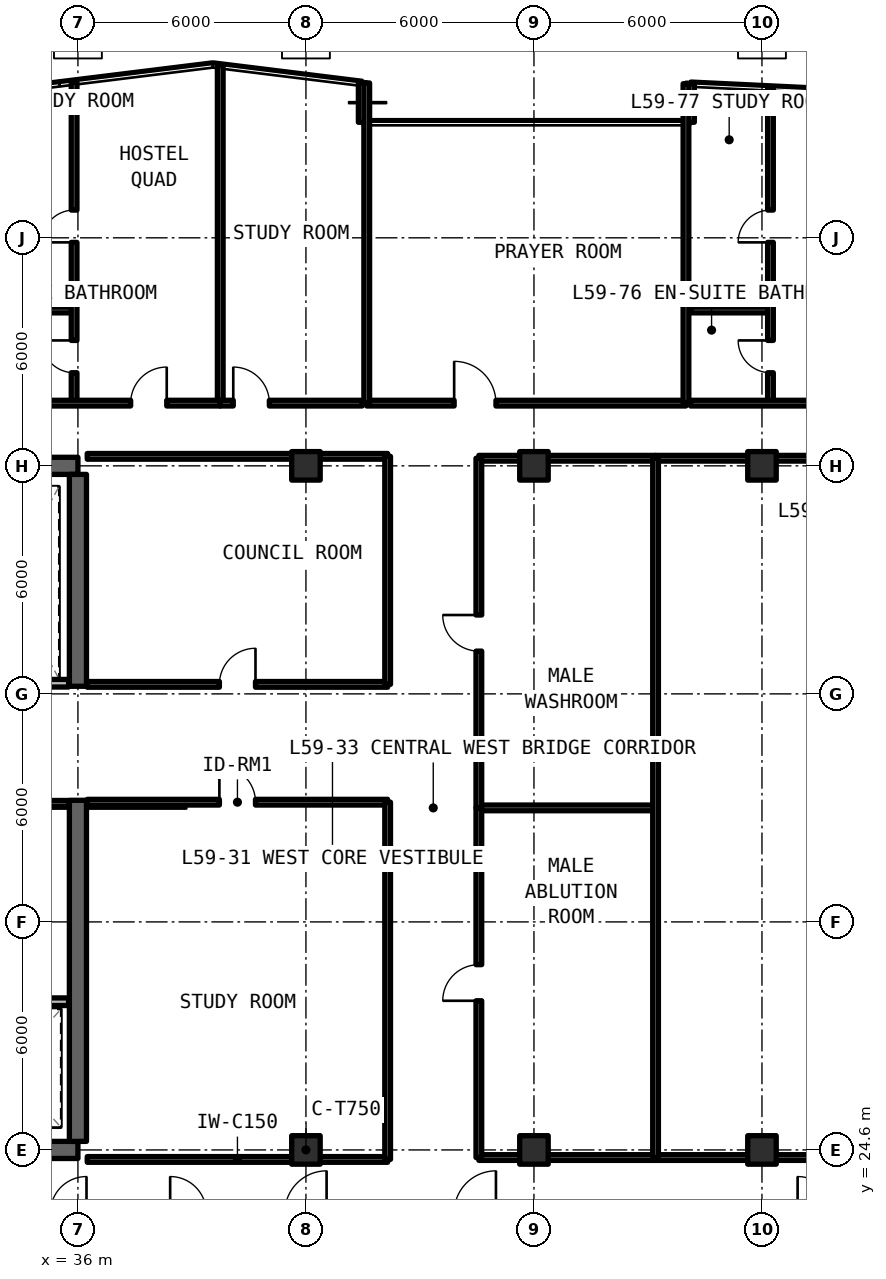
"""IFC4 building model, lengths in metres.
Left out: names, types, materials, properties, quantities, classifications, styles, units other than length and angle.
Written with IfcOpenShell. Run it as: python <this file> out.ifc"""

import sys

from ifc_helpers import new_model, si_unit, direction, frame, frame_2d, origin, origin_2d, place, context, subcontext, project, spatial, rectangle, extrude, element, fill, save


model = new_model("IFC4")
c1 = context("Model", 3, precision=1e-05, world=origin(), true_north=direction((0.0, 1.0)))
c2 = subcontext(c1, "Body", "Model", "MODEL_VIEW")
j1 = project(units=[si_unit("LENGTHUNIT", "METRE"), si_unit("PLANEANGLEUNIT", "RADIAN")], contexts=[c1])
p1 = place(None, origin())
s1 = spatial("IfcSite", under=j1, at=p1, CompositionType="ELEMENT")
p2 = place(p1, origin())
s2 = spatial("IfcBuilding", under=s1, at=p2, CompositionType="ELEMENT")
p3 = place(p2, frame((0.0, 0.0, 211.86)))
s3 = spatial("IfcBuildingStorey", under=s2, at=p3, CompositionType="ELEMENT", Elevation=211.86)
for number, where, z_axis, x_axis in (
    (1, (24.0, 24.6, 0.0), (0.0, 0.0, 1.0), (1.0, 0.0, 0.0)),
    (2, (36.0, 42.6, 0.0), (0.0, 0.0, 1.0), (-1.0, 0.0, 0.0)),
):
    element("IfcWall", number, at=place(p3, frame(where, z_axis=z_axis, x_axis=x_axis)), inside=s3, PredefinedType="SHEAR", context=c2, shape_type="SweptSolid", body=[
        extrude(rectangle(XDim=12.0, YDim=0.45, at=frame_2d((6.0, 0.0))), origin(), (0.0, 0.0, 1.0), 3.63),
    ])
p4 = place(p3, frame((36.0, 24.825, 0.0), z_axis=(0.0, 0.0, 1.0), x_axis=(0.0, 1.0, 0.0)))
e3 = element("IfcWall", 3, at=p4, inside=s3, PredefinedType="SHEAR", context=c2, shape_type="SweptSolid", body=[
    extrude(rectangle(XDim=8.975, YDim=0.45, at=frame_2d((4.488, 0.0))), origin(), (0.0, 0.0, 1.0), 3.63),
])
p5 = place(p3, frame((36.0, 36.8, 0.0), z_axis=(0.0, 0.0, 1.0), x_axis=(0.0, 1.0, 0.0)))
e4 = element("IfcWall", 4, at=p5, inside=s3, PredefinedType="SHEAR", context=c2, shape_type="SweptSolid", body=[
    extrude(rectangle(XDim=5.575, YDim=0.45, at=frame_2d((2.788, 0.0))), origin(), (0.0, 0.0, 1.0), 3.63),
])
for number, where, z_axis, x_axis in (
    (5, (42.0, 24.6, 0.0), (0.0, 0.0, 1.0), (1.0, 0.0, 0.0)),
    (6, (42.0, 42.6, 0.0), (0.0, 0.0, 1.0), (1.0, 0.0, 0.0)),
    (7, (48.0, 24.6, 0.0), (0.0, 0.0, 1.0), (1.0, 0.0, 0.0)),
    (8, (48.0, 42.6, 0.0), (0.0, 0.0, 1.0), (1.0, 0.0, 0.0)),
    (9, (54.0, 24.6, 0.0), (0.0, 0.0, 1.0), (1.0, 0.0, 0.0)),
    (10, (54.0, 42.6, 0.0), (0.0, 0.0, 1.0), (1.0, 0.0, 0.0)),
):
    element("IfcColumn", number, at=place(p3, frame(where, z_axis=z_axis, x_axis=x_axis)), inside=s3, PredefinedType="COLUMN", context=c2, shape_type="SweptSolid", body=[
        extrude(rectangle(XDim=0.75, YDim=0.75, at=origin_2d()), origin(), (0.0, 0.0, 1.0), 3.63),
    ])
p6 = place(p3, frame((52.11, 52.655, 0.0), z_axis=(0.0, 0.0, 1.0), x_axis=(0.0, -1.0, 0.0)))
e11 = element("IfcWall", 11, at=p6, inside=s3, PredefinedType="SOLIDWALL", context=c2, shape_type="SweptSolid", body=[
    extrude(rectangle(XDim=1.015, YDim=0.22, at=frame_2d((0.507, 0.0))), origin(), (0.0, 0.0, 1.0), 3.41),
])
p7 = place(p3, frame((43.49, 51.64, 0.0), z_axis=(0.0, 0.0, 1.0), x_axis=(0.0, 1.0, 0.0)))
e12 = element("IfcWall", 12, at=p7, inside=s3, PredefinedType="SOLIDWALL", context=c2, shape_type="SweptSolid", body=[
    extrude(rectangle(XDim=1.033, YDim=0.22, at=frame_2d((0.516, 0.0))), origin(), (0.0, 0.0, 1.0), 3.41),
])
p8 = place(p3, frame((28.17, 28.5, 0.0), z_axis=(0.0, 0.0, 1.0), x_axis=(1.0, 0.0, 0.0)))
e13 = element("IfcWall", 13, at=p8, inside=s3, PredefinedType="SOLIDWALL", context=c2, shape_type="SweptSolid", body=[
    extrude(rectangle(XDim=7.585, YDim=0.2, at=frame_2d((3.792, 0.0))), origin(), (0.0, 0.0, 1.0), 2.63),
])
p9 = place(p8, frame((3.03, 0.0, 0.0)))
e14 = element("IfcOpeningElement", 14, at=p9, cuts=e13, PredefinedType="OPENING", context=c2, shape_type="SweptSolid", body=[
    extrude(rectangle(XDim=1.0, YDim=2.15, at=frame_2d((0.5, 1.075))), frame((0.0, 0.11, 0.0), z_axis=(0.0, -1.0, 0.0), x_axis=(1.0, 0.0, 0.0)), (0.0, 0.0, 1.0), 0.22),
])
p10 = place(p3, frame((34.01, 33.72, 0.0), z_axis=(0.0, 0.0, 1.0), x_axis=(1.0, 0.0, 0.0)))
e15 = element("IfcWall", 15, at=p10, inside=s3, PredefinedType="SOLIDWALL", context=c2, shape_type="SweptSolid", body=[
    extrude(rectangle(XDim=1.745, YDim=0.15, at=frame_2d((0.873, 0.0))), origin(), (0.0, 0.0, 1.0), 2.63),
])
p11 = place(p10, frame((0.28, 0.0, 0.0)))
e16 = element("IfcOpeningElement", 16, at=p11, cuts=e15, PredefinedType="OPENING", context=c2, shape_type="SweptSolid", body=[
    extrude(rectangle(XDim=0.85, YDim=2.1, at=frame_2d((0.425, 1.05))), frame((0.0, 0.085, 0.0), z_axis=(0.0, -1.0, 0.0), x_axis=(1.0, 0.0, 0.0)), (0.0, 0.0, 1.0), 0.17),
])
p12 = place(p3, frame((32.68, 36.88, 0.0), z_axis=(0.0, 0.0, 1.0), x_axis=(1.0, 0.0, 0.0)))
e17 = element("IfcWall", 17, at=p12, inside=s3, PredefinedType="SOLIDWALL", context=c2, shape_type="SweptSolid", body=[
    extrude(rectangle(XDim=3.075, YDim=0.2, at=frame_2d((1.538, 0.0))), origin(), (0.0, 0.0, 1.0), 2.63),
])
p13 = place(p3, frame((36.245, 24.35, 0.0), z_axis=(0.0, 0.0, 1.0), x_axis=(1.0, 0.0, 0.0)))
e18 = element("IfcWall", 18, at=p13, inside=s3, PredefinedType="SOLIDWALL", context=c2, shape_type="SweptSolid", body=[
    extrude(rectangle(XDim=7.905, YDim=0.15, at=frame_2d((3.952, 0.0))), origin(), (0.0, 0.0, 1.0), 2.63),
])
p14 = place(p3, frame((36.245, 33.75, 0.0), z_axis=(0.0, 0.0, 1.0), x_axis=(1.0, 0.0, 0.0)))
e19 = element("IfcWall", 19, at=p14, inside=s3, PredefinedType="SOLIDWALL", context=c2, shape_type="SweptSolid", body=[
    extrude(rectangle(XDim=7.905, YDim=0.15, at=frame_2d((3.952, 0.0))), origin(), (0.0, 0.0, 1.0), 2.63),
])
p15 = place(p14, frame((3.478, 0.0, 0.0)))
e20 = element("IfcOpeningElement", 20, at=p15, cuts=e19, PredefinedType="OPENING", context=c2, shape_type="SweptSolid", body=[
    extrude(rectangle(XDim=0.95, YDim=2.15, at=frame_2d((0.475, 1.075))), frame((0.0, 0.085, 0.0), z_axis=(0.0, -1.0, 0.0), x_axis=(1.0, 0.0, 0.0)), (0.0, 0.0, 1.0), 0.17),
])
p16 = place(p3, frame((44.15, 24.35, 0.0), z_axis=(0.0, 0.0, 1.0), x_axis=(0.0, 1.0, 0.0)))
e21 = element("IfcWall", 21, at=p16, inside=s3, PredefinedType="SOLIDWALL", context=c2, shape_type="SweptSolid", body=[
    extrude(rectangle(XDim=9.4, YDim=0.15, at=frame_2d((4.7, 0.0))), origin(), (0.0, 0.0, 1.0), 2.63),
])
p17 = place(p3, frame((36.245, 36.85, 0.0), z_axis=(0.0, 0.0, 1.0), x_axis=(1.0, 0.0, 0.0)))
e22 = element("IfcWall", 22, at=p17, inside=s3, PredefinedType="SOLIDWALL", context=c2, shape_type="SweptSolid", body=[
    extrude(rectangle(XDim=7.905, YDim=0.15, at=frame_2d((3.952, 0.0))), origin(), (0.0, 0.0, 1.0), 2.63),
])
p18 = place(p17, frame((3.478, 0.0, 0.0)))
e23 = element("IfcOpeningElement", 23, at=p18, cuts=e22, PredefinedType="OPENING", context=c2, shape_type="SweptSolid", body=[
    extrude(rectangle(XDim=0.95, YDim=2.15, at=frame_2d((0.475, 1.075))), frame((0.0, 0.085, 0.0), z_axis=(0.0, -1.0, 0.0), x_axis=(1.0, 0.0, 0.0)), (0.0, 0.0, 1.0), 0.17),
])
p19 = place(p3, frame((36.245, 42.85, 0.0), z_axis=(0.0, 0.0, 1.0), x_axis=(1.0, 0.0, 0.0)))
e24 = element("IfcWall", 24, at=p19, inside=s3, PredefinedType="SOLIDWALL", context=c2, shape_type="SweptSolid", body=[
    extrude(rectangle(XDim=7.905, YDim=0.15, at=frame_2d((3.952, 0.0))), origin(), (0.0, 0.0, 1.0), 2.63),
])
p20 = place(p3, frame((44.15, 36.85, 0.0), z_axis=(0.0, 0.0, 1.0), x_axis=(0.0, 1.0, 0.0)))
e25 = element("IfcWall", 25, at=p20, inside=s3, PredefinedType="SOLIDWALL", context=c2, shape_type="SweptSolid", body=[
    extrude(rectangle(XDim=6.0, YDim=0.15, at=frame_2d((3.0, 0.0))), origin(), (0.0, 0.0, 1.0), 2.63),
])
for number, where, z_axis, x_axis in (
    (26, (46.55, 24.4, 0.0), (0.0, 0.0, 1.0), (1.0, 0.0, 0.0)),
    (27, (46.55, 33.6, 0.0), (0.0, 0.0, 1.0), (1.0, 0.0, 0.0)),
):
    element("IfcWall", number, at=place(p3, frame(where, z_axis=z_axis, x_axis=x_axis)), inside=s3, PredefinedType="SOLIDWALL", context=c2, shape_type="SweptSolid", body=[
        extrude(rectangle(XDim=4.65, YDim=0.15, at=frame_2d((2.325, 0.0))), origin(), (0.0, 0.0, 1.0), 2.63),
    ])
p21 = place(p3, frame((46.55, 24.4, 0.0), z_axis=(0.0, 0.0, 1.0), x_axis=(0.0, 1.0, 0.0)))
e28 = element("IfcWall", 28, at=p21, inside=s3, PredefinedType="SOLIDWALL", context=c2, shape_type="SweptSolid", body=[
    extrude(rectangle(XDim=9.2, YDim=0.15, at=frame_2d((4.6, 0.0))), origin(), (0.0, 0.0, 1.0), 2.63),
])
p22 = place(p21, frame((4.125, 0.0, 0.0)))
e29 = element("IfcOpeningElement", 29, at=p22, cuts=e28, PredefinedType="OPENING", context=c2, shape_type="SweptSolid", body=[
    extrude(rectangle(XDim=0.95, YDim=2.15, at=frame_2d((0.475, 1.075))), frame((0.0, 0.085, 0.0), z_axis=(0.0, -1.0, 0.0), x_axis=(1.0, 0.0, 0.0)), (0.0, 0.0, 1.0), 0.17),
])
p23 = place(p3, frame((46.55, 42.8, 0.0), z_axis=(0.0, 0.0, 1.0), x_axis=(1.0, 0.0, 0.0)))
e30 = element("IfcWall", 30, at=p23, inside=s3, PredefinedType="SOLIDWALL", context=c2, shape_type="SweptSolid", body=[
    extrude(rectangle(XDim=4.65, YDim=0.15, at=frame_2d((2.325, 0.0))), origin(), (0.0, 0.0, 1.0), 2.63),
])
p24 = place(p3, frame((46.55, 33.6, 0.0), z_axis=(0.0, 0.0, 1.0), x_axis=(0.0, 1.0, 0.0)))
e31 = element("IfcWall", 31, at=p24, inside=s3, PredefinedType="SOLIDWALL", context=c2, shape_type="SweptSolid", body=[
    extrude(rectangle(XDim=9.2, YDim=0.15, at=frame_2d((4.6, 0.0))), origin(), (0.0, 0.0, 1.0), 2.63),
])
p25 = place(p24, frame((4.125, 0.0, 0.0)))
e32 = element("IfcOpeningElement", 32, at=p25, cuts=e31, PredefinedType="OPENING", context=c2, shape_type="SweptSolid", body=[
    extrude(rectangle(XDim=0.95, YDim=2.15, at=frame_2d((0.475, 1.075))), frame((0.0, 0.085, 0.0), z_axis=(0.0, -1.0, 0.0), x_axis=(1.0, 0.0, 0.0)), (0.0, 0.0, 1.0), 0.17),
])
p26 = place(p3, frame((51.2, 24.4, 0.0), z_axis=(0.0, 0.0, 1.0), x_axis=(1.0, 0.0, 0.0)))
e33 = element("IfcWall", 33, at=p26, inside=s3, PredefinedType="SOLIDWALL", context=c2, shape_type="SweptSolid", body=[
    extrude(rectangle(XDim=11.6, YDim=0.15, at=frame_2d((5.8, 0.0))), origin(), (0.0, 0.0, 1.0), 2.63),
])
p27 = place(p26, frame((5.1, 0.0, 0.0)))
e34 = element("IfcOpeningElement", 34, at=p27, cuts=e33, PredefinedType="OPENING", context=c2, shape_type="SweptSolid", body=[
    extrude(rectangle(XDim=1.4, YDim=2.15, at=frame_2d((0.7, 1.075))), frame((0.0, 0.085, 0.0), z_axis=(0.0, -1.0, 0.0), x_axis=(1.0, 0.0, 0.0)), (0.0, 0.0, 1.0), 0.17),
])
p28 = place(p3, frame((51.2, 42.8, 0.0), z_axis=(0.0, 0.0, 1.0), x_axis=(1.0, 0.0, 0.0)))
e35 = element("IfcWall", 35, at=p28, inside=s3, PredefinedType="SOLIDWALL", context=c2, shape_type="SweptSolid", body=[
    extrude(rectangle(XDim=11.6, YDim=0.15, at=frame_2d((5.8, 0.0))), origin(), (0.0, 0.0, 1.0), 2.63),
])
p29 = place(p3, frame((51.2, 24.4, 0.0), z_axis=(0.0, 0.0, 1.0), x_axis=(0.0, 1.0, 0.0)))
e36 = element("IfcWall", 36, at=p29, inside=s3, PredefinedType="SOLIDWALL", context=c2, shape_type="SweptSolid", body=[
    extrude(rectangle(XDim=18.4, YDim=0.15, at=frame_2d((9.2, 0.0))), origin(), (0.0, 0.0, 1.0), 2.63),
])
p30 = place(p3, frame((43.6, 44.25, 0.0), z_axis=(0.0, 0.0, 1.0), x_axis=(1.0, 0.0, 0.0)))
e37 = element("IfcWall", 37, at=p30, inside=s3, PredefinedType="SOLIDWALL", context=c2, shape_type="SweptSolid", body=[
    extrude(rectangle(XDim=8.4, YDim=0.15, at=frame_2d((4.2, 0.0))), origin(), (0.0, 0.0, 1.0), 2.63),
])
p31 = place(p30, frame((2.3, 0.0, 0.0)))
e38 = element("IfcOpeningElement", 38, at=p31, cuts=e37, PredefinedType="OPENING", context=c2, shape_type="SweptSolid", body=[
    extrude(rectangle(XDim=1.1, YDim=2.15, at=frame_2d((0.55, 1.075))), frame((0.0, 0.085, 0.0), z_axis=(0.0, -1.0, 0.0), x_axis=(1.0, 0.0, 0.0)), (0.0, 0.0, 1.0), 0.17),
])
p32 = place(p3, frame((43.6, 44.25, 0.0), z_axis=(0.0, 0.0, 1.0), x_axis=(0.0, 1.0, 0.0)))
e39 = element("IfcWall", 39, at=p32, inside=s3, PredefinedType="SOLIDWALL", context=c2, shape_type="SweptSolid", body=[
    extrude(rectangle(XDim=8.424, YDim=0.15, at=frame_2d((4.212, 0.0))), origin(), (0.0, 0.0, 1.0), 2.63),
])
p33 = place(p3, frame((52.0, 44.25, 0.0), z_axis=(0.0, 0.0, 1.0), x_axis=(0.0, 1.0, 0.0)))
e40 = element("IfcWall", 40, at=p33, inside=s3, PredefinedType="SOLIDWALL", context=c2, shape_type="SweptSolid", body=[
    extrude(rectangle(XDim=8.404, YDim=0.15, at=frame_2d((4.202, 0.0))), origin(), (0.0, 0.0, 1.0), 2.63),
])
p34 = place(p3, frame((39.745, 44.25, 0.0), z_axis=(0.0, 0.0, 1.0), x_axis=(0.0, 1.0, 0.0)))
e41 = element("IfcWall", 41, at=p34, inside=s3, PredefinedType="SOLIDWALL", context=c2, shape_type="SweptSolid", body=[
    extrude(rectangle(XDim=8.885, YDim=0.15, at=frame_2d((4.442, 0.0))), origin(), (0.0, 0.0, 1.0), 2.63),
])
p35 = place(p3, frame((33.918, 46.7, 0.0), z_axis=(0.0, 0.0, 1.0), x_axis=(1.0, 0.0, 0.0)))
e42 = element("IfcWall", 42, at=p35, inside=s3, PredefinedType="PARTITIONING", context=c2, shape_type="SweptSolid", body=[
    extrude(rectangle(XDim=1.981, YDim=0.15, at=frame_2d((0.991, 0.0))), origin(), (0.0, 0.0, 1.0), 2.63),
])
p36 = place(p3, frame((35.899, 44.25, 0.0), z_axis=(0.0, 0.0, 1.0), x_axis=(0.0, 1.0, 0.0)))
e43 = element("IfcWall", 43, at=p36, inside=s3, PredefinedType="PARTITIONING", context=c2, shape_type="SweptSolid", body=[
    extrude(rectangle(XDim=8.458, YDim=0.15, at=frame_2d((4.229, 0.0))), origin(), (0.0, 0.0, 1.0), 2.63),
])
p37 = place(p36, frame((0.8, 0.0, 0.0)))
e44 = element("IfcOpeningElement", 44, at=p37, cuts=e43, PredefinedType="OPENING", context=c2, shape_type="SweptSolid", body=[
    extrude(rectangle(XDim=0.85, YDim=2.1, at=frame_2d((0.425, 1.05))), frame((0.0, 0.085, 0.0), z_axis=(0.0, -1.0, 0.0), x_axis=(1.0, 0.0, 0.0)), (0.0, 0.0, 1.0), 0.17),
])
p38 = place(p36, frame((4.23, 0.0, 0.0)))
e45 = element("IfcOpeningElement", 45, at=p38, cuts=e43, PredefinedType="OPENING", context=c2, shape_type="SweptSolid", body=[
    extrude(rectangle(XDim=0.85, YDim=2.1, at=frame_2d((0.425, 1.05))), frame((0.0, 0.085, 0.0), z_axis=(0.0, -1.0, 0.0), x_axis=(1.0, 0.0, 0.0)), (0.0, 0.0, 1.0), 0.17),
])
p39 = place(p3, frame((33.918, 44.25, 0.0), z_axis=(0.0, 0.0, 1.0), x_axis=(1.0, 0.0, 0.0)))
e46 = element("IfcWall", 46, at=p39, inside=s3, PredefinedType="SOLIDWALL", context=c2, shape_type="SweptSolid", body=[
    extrude(rectangle(XDim=5.827, YDim=0.15, at=frame_2d((2.913, 0.0))), origin(), (0.0, 0.0, 1.0), 2.63),
])
p40 = place(p39, frame((3.469, 0.0, 0.0)))
e47 = element("IfcOpeningElement", 47, at=p40, cuts=e46, PredefinedType="OPENING", context=c2, shape_type="SweptSolid", body=[
    extrude(rectangle(XDim=0.95, YDim=2.15, at=frame_2d((0.475, 1.075))), frame((0.0, 0.085, 0.0), z_axis=(0.0, -1.0, 0.0), x_axis=(1.0, 0.0, 0.0)), (0.0, 0.0, 1.0), 0.17),
])
p41 = place(p3, frame((39.745, 44.25, 0.0), z_axis=(0.0, 0.0, 1.0), x_axis=(1.0, 0.0, 0.0)))
e48 = element("IfcWall", 48, at=p41, inside=s3, PredefinedType="SOLIDWALL", context=c2, shape_type="SweptSolid", body=[
    extrude(rectangle(XDim=3.735, YDim=0.15, at=frame_2d((1.868, 0.0))), origin(), (0.0, 0.0, 1.0), 2.63),
])
p42 = place(p41, frame((0.343, 0.0, 0.0)))
e49 = element("IfcOpeningElement", 49, at=p42, cuts=e48, PredefinedType="OPENING", context=c2, shape_type="SweptSolid", body=[
    extrude(rectangle(XDim=0.95, YDim=2.15, at=frame_2d((0.475, 1.075))), frame((0.0, 0.085, 0.0), z_axis=(0.0, -1.0, 0.0), x_axis=(1.0, 0.0, 0.0)), (0.0, 0.0, 1.0), 0.17),
])
p43 = place(p3, frame((52.12, 46.7, 0.0), z_axis=(0.0, 0.0, 1.0), x_axis=(1.0, 0.0, 0.0)))
e50 = element("IfcWall", 50, at=p43, inside=s3, PredefinedType="PARTITIONING", context=c2, shape_type="SweptSolid", body=[
    extrude(rectangle(XDim=2.104, YDim=0.15, at=frame_2d((1.052, 0.0))), origin(), (0.0, 0.0, 1.0), 2.63),
])
p44 = place(p3, frame((54.224, 44.25, 0.0), z_axis=(0.0, 0.0, 1.0), x_axis=(0.0, 1.0, 0.0)))
e51 = element("IfcWall", 51, at=p44, inside=s3, PredefinedType="PARTITIONING", context=c2, shape_type="SweptSolid", body=[
    extrude(rectangle(XDim=8.303, YDim=0.15, at=frame_2d((4.152, 0.0))), origin(), (0.0, 0.0, 1.0), 2.63),
])
p45 = place(p44, frame((0.8, 0.0, 0.0)))
e52 = element("IfcOpeningElement", 52, at=p45, cuts=e51, PredefinedType="OPENING", context=c2, shape_type="SweptSolid", body=[
    extrude(rectangle(XDim=0.85, YDim=2.1, at=frame_2d((0.425, 1.05))), frame((0.0, 0.085, 0.0), z_axis=(0.0, -1.0, 0.0), x_axis=(1.0, 0.0, 0.0)), (0.0, 0.0, 1.0), 0.17),
])
p46 = place(p44, frame((4.23, 0.0, 0.0)))
e53 = element("IfcOpeningElement", 53, at=p46, cuts=e51, PredefinedType="OPENING", context=c2, shape_type="SweptSolid", body=[
    extrude(rectangle(XDim=0.85, YDim=2.1, at=frame_2d((0.425, 1.05))), frame((0.0, 0.085, 0.0), z_axis=(0.0, -1.0, 0.0), x_axis=(1.0, 0.0, 0.0)), (0.0, 0.0, 1.0), 0.17),
])
p47 = place(p3, frame((52.12, 44.25, 0.0), z_axis=(0.0, 0.0, 1.0), x_axis=(1.0, 0.0, 0.0)))
e54 = element("IfcWall", 54, at=p47, inside=s3, PredefinedType="SOLIDWALL", context=c2, shape_type="SweptSolid", body=[
    extrude(rectangle(XDim=6.187, YDim=0.15, at=frame_2d((3.093, 0.0))), origin(), (0.0, 0.0, 1.0), 2.63),
])
p48 = place(p47, frame((3.71, 0.0, 0.0)))
e55 = element("IfcOpeningElement", 55, at=p48, cuts=e54, PredefinedType="OPENING", context=c2, shape_type="SweptSolid", body=[
    extrude(rectangle(XDim=0.95, YDim=2.15, at=frame_2d((0.475, 1.075))), frame((0.0, 0.085, 0.0), z_axis=(0.0, -1.0, 0.0), x_axis=(1.0, 0.0, 0.0)), (0.0, 0.0, 1.0), 0.17),
])
p49 = place(p15, origin())
e56 = element("IfcDoor", 56, at=p49, inside=s3, OperationType="SINGLE_SWING_LEFT", PredefinedType="DOOR", context=c2, shape_type="SweptSolid", body=[
    extrude(rectangle(XDim=0.95, YDim=2.15, at=frame_2d((0.475, 1.075))), frame((0.0, 0.025, 0.0), z_axis=(0.0, -1.0, 0.0), x_axis=(1.0, 0.0, 0.0)), (0.0, 0.0, 1.0), 0.05),
])
fill(e20, e56)
p50 = place(p18, origin())
e57 = element("IfcDoor", 57, at=p50, inside=s3, OperationType="SINGLE_SWING_RIGHT", PredefinedType="DOOR", context=c2, shape_type="SweptSolid", body=[
    extrude(rectangle(XDim=0.95, YDim=2.15, at=frame_2d((0.475, 1.075))), frame((0.0, 0.025, 0.0), z_axis=(0.0, -1.0, 0.0), x_axis=(1.0, 0.0, 0.0)), (0.0, 0.0, 1.0), 0.05),
])
fill(e23, e57)
p51 = place(p22, origin())
e58 = element("IfcDoor", 58, at=p51, inside=s3, OperationType="SINGLE_SWING_LEFT", PredefinedType="DOOR", context=c2, shape_type="SweptSolid", body=[
    extrude(rectangle(XDim=0.95, YDim=2.15, at=frame_2d((0.475, 1.075))), frame((0.0, 0.025, 0.0), z_axis=(0.0, -1.0, 0.0), x_axis=(1.0, 0.0, 0.0)), (0.0, 0.0, 1.0), 0.05),
])
fill(e29, e58)
p52 = place(p25, origin())
e59 = element("IfcDoor", 59, at=p52, inside=s3, OperationType="SINGLE_SWING_RIGHT", PredefinedType="DOOR", context=c2, shape_type="SweptSolid", body=[
    extrude(rectangle(XDim=0.95, YDim=2.15, at=frame_2d((0.475, 1.075))), frame((0.0, 0.025, 0.0), z_axis=(0.0, -1.0, 0.0), x_axis=(1.0, 0.0, 0.0)), (0.0, 0.0, 1.0), 0.05),
])
fill(e32, e59)
p53 = place(p31, origin())
e60 = element("IfcDoor", 60, at=p53, inside=s3, OperationType="SINGLE_SWING_LEFT", PredefinedType="DOOR", context=c2, shape_type="SweptSolid", body=[
    extrude(rectangle(XDim=1.1, YDim=2.15, at=frame_2d((0.55, 1.075))), frame((0.0, 0.025, 0.0), z_axis=(0.0, -1.0, 0.0), x_axis=(1.0, 0.0, 0.0)), (0.0, 0.0, 1.0), 0.05),
])
fill(e38, e60)
p54 = place(p37, origin())
e61 = element("IfcDoor", 61, at=p54, inside=s3, OperationType="SINGLE_SWING_RIGHT", PredefinedType="DOOR", context=c2, shape_type="SweptSolid", body=[
    extrude(rectangle(XDim=0.85, YDim=2.1, at=frame_2d((0.425, 1.05))), frame((0.0, 0.025, 0.0), z_axis=(0.0, -1.0, 0.0), x_axis=(1.0, 0.0, 0.0)), (0.0, 0.0, 1.0), 0.05),
])
fill(e44, e61)
p55 = place(p38, origin())
e62 = element("IfcDoor", 62, at=p55, inside=s3, OperationType="SINGLE_SWING_LEFT", PredefinedType="DOOR", context=c2, shape_type="SweptSolid", body=[
    extrude(rectangle(XDim=0.85, YDim=2.1, at=frame_2d((0.425, 1.05))), frame((0.0, 0.025, 0.0), z_axis=(0.0, -1.0, 0.0), x_axis=(1.0, 0.0, 0.0)), (0.0, 0.0, 1.0), 0.05),
])
fill(e45, e62)
p56 = place(p40, origin())
e63 = element("IfcDoor", 63, at=p56, inside=s3, OperationType="SINGLE_SWING_RIGHT", PredefinedType="DOOR", context=c2, shape_type="SweptSolid", body=[
    extrude(rectangle(XDim=0.95, YDim=2.15, at=frame_2d((0.475, 1.075))), frame((0.0, 0.025, 0.0), z_axis=(0.0, -1.0, 0.0), x_axis=(1.0, 0.0, 0.0)), (0.0, 0.0, 1.0), 0.05),
])
fill(e47, e63)
p57 = place(p42, origin())
e64 = element("IfcDoor", 64, at=p57, inside=s3, OperationType="SINGLE_SWING_LEFT", PredefinedType="DOOR", context=c2, shape_type="SweptSolid", body=[
    extrude(rectangle(XDim=0.95, YDim=2.15, at=frame_2d((0.475, 1.075))), frame((0.0, 0.025, 0.0), z_axis=(0.0, -1.0, 0.0), x_axis=(1.0, 0.0, 0.0)), (0.0, 0.0, 1.0), 0.05),
])
fill(e49, e64)
p58 = place(p45, origin())
e65 = element("IfcDoor", 65, at=p58, inside=s3, OperationType="SINGLE_SWING_RIGHT", PredefinedType="DOOR", context=c2, shape_type="SweptSolid", body=[
    extrude(rectangle(XDim=0.85, YDim=2.1, at=frame_2d((0.425, 1.05))), frame((0.0, 0.025, 0.0), z_axis=(0.0, -1.0, 0.0), x_axis=(1.0, 0.0, 0.0)), (0.0, 0.0, 1.0), 0.05),
])
fill(e52, e65)
p59 = place(p46, origin())
e66 = element("IfcDoor", 66, at=p59, inside=s3, OperationType="SINGLE_SWING_LEFT", PredefinedType="DOOR", context=c2, shape_type="SweptSolid", body=[
    extrude(rectangle(XDim=0.85, YDim=2.1, at=frame_2d((0.425, 1.05))), frame((0.0, 0.025, 0.0), z_axis=(0.0, -1.0, 0.0), x_axis=(1.0, 0.0, 0.0)), (0.0, 0.0, 1.0), 0.05),
])
fill(e53, e66)
save(model, sys.argv[1])
